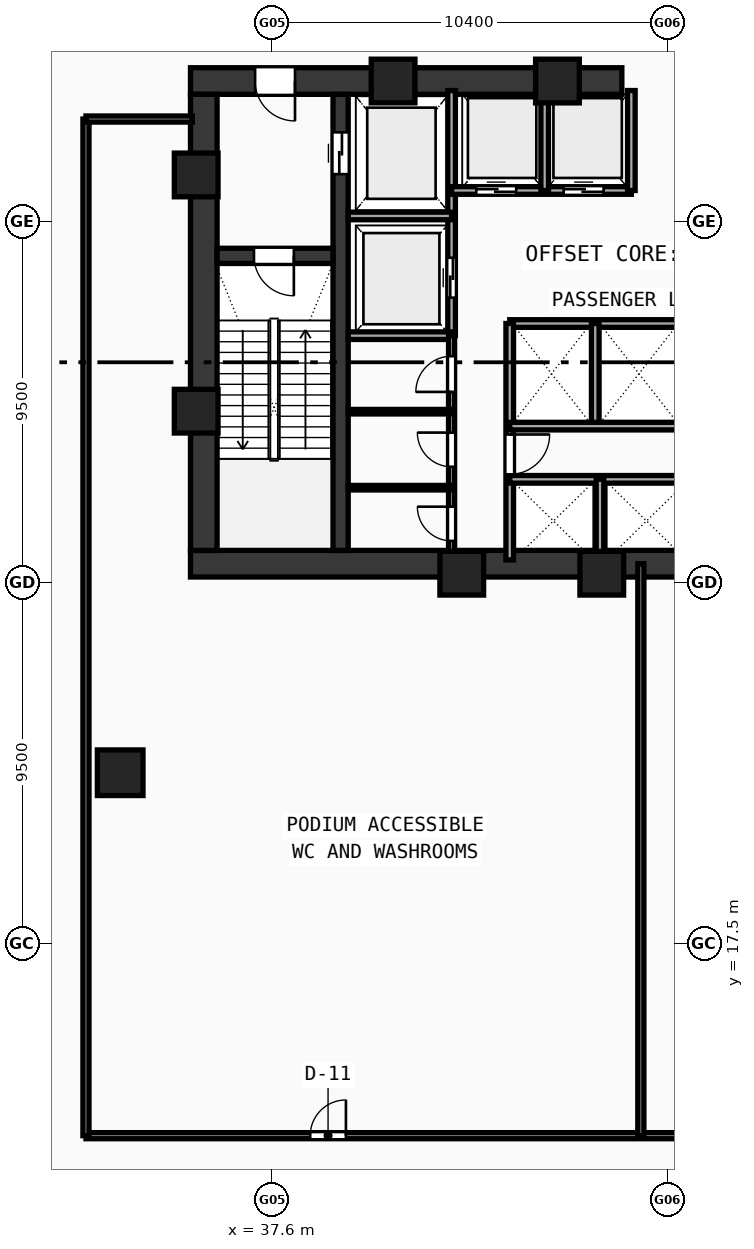
"""IFC4 building model, lengths in metres.
Left out: names, types, materials, properties, quantities, classifications, styles, units other than length and angle.
Written with IfcOpenShell. Run it as: python <this file> out.ifc"""

import sys

from ifc_helpers import new_model, si_unit, direction, frame, frame_2d, origin, origin_with_axes, origin_2d, place, context, subcontext, project, spatial, rectangle, hollow_rectangle, extrude, source, transform, mapped, element, fill, save


model = new_model("IFC4")
c1 = context("Model", 3, precision=1e-05, world=origin(), true_north=direction((0.0, 1.0)))
c2 = subcontext(c1, "Body", "Model", "MODEL_VIEW")
j1 = project(units=[si_unit("LENGTHUNIT", "METRE"), si_unit("PLANEANGLEUNIT", "RADIAN")], contexts=[c1])
p1 = place(None, origin())
s1 = spatial("IfcSite", under=j1, at=p1, CompositionType="ELEMENT")
p2 = place(p1, origin())
s2 = spatial("IfcBuilding", under=s1, at=p2, CompositionType="ELEMENT")
p3 = place(p2, frame((0.0, 0.0, 14.4)))
s3 = spatial("IfcBuildingStorey", under=s2, at=p3, CompositionType="ELEMENT", Elevation=14.4)
p4 = place(p3, frame((35.45, 27.5, 0.0), z_axis=(0.0, 0.0, 1.0), x_axis=(1.0, 0.0, 0.0)))
e1 = element("IfcWall", 1, at=p4, inside=s3, PredefinedType="SHEAR", context=c2, shape_type="SweptSolid", body=[
    extrude(rectangle(XDim=25.1, YDim=0.7, at=frame_2d((12.55, 0.0))), origin(), (0.0, 0.0, 1.0), 4.52),
])
p5 = place(p3, frame((35.45, 40.2, 0.0), z_axis=(0.0, 0.0, 1.0), x_axis=(1.0, 0.0, 0.0)))
e2 = element("IfcWall", 2, at=p5, inside=s3, PredefinedType="SHEAR", context=c2, shape_type="SweptSolid", body=[
    extrude(rectangle(XDim=11.35, YDim=0.7, at=frame_2d((5.675, 0.0))), origin(), (0.0, 0.0, 1.0), 4.52),
])
p6 = place(p5, frame((1.7, 0.0, 0.0)))
e3 = element("IfcOpeningElement", 3, at=p6, cuts=e2, PredefinedType="OPENING", context=c2, shape_type="SweptSolid", body=[
    extrude(rectangle(XDim=1.05, YDim=2.1, at=frame_2d((0.525, 1.05))), frame((0.0, 0.36, 0.0), z_axis=(0.0, -1.0, 0.0), x_axis=(1.0, 0.0, 0.0)), (0.0, 0.0, 1.0), 0.72),
])
p7 = place(p3, frame((35.8, 27.85, 0.0), z_axis=(0.0, 0.0, 1.0), x_axis=(0.0, 1.0, 0.0)))
e4 = element("IfcWall", 4, at=p7, inside=s3, PredefinedType="SHEAR", context=c2, shape_type="SweptSolid", body=[
    extrude(rectangle(XDim=12.0, YDim=0.7, at=frame_2d((6.0, 0.0))), origin(), (0.0, 0.0, 1.0), 4.52),
])
p8 = place(p3, frame((39.4, 27.85, 0.0), z_axis=(0.0, 0.0, 1.0), x_axis=(0.0, 1.0, 0.0)))
e5 = element("IfcWall", 5, at=p8, inside=s3, PredefinedType="SHEAR", context=c2, shape_type="SweptSolid", body=[
    extrude(rectangle(XDim=12.0, YDim=0.4, at=frame_2d((6.0, 0.0))), origin(), (0.0, 0.0, 1.0), 4.52),
])
p9 = place(p8, frame((9.9, 0.0, 0.0)))
e6 = element("IfcOpeningElement", 6, at=p9, cuts=e5, PredefinedType="OPENING", context=c2, shape_type="SweptSolid", body=[
    extrude(rectangle(XDim=1.1, YDim=2.1, at=frame_2d((0.55, 1.05))), frame((0.0, 0.21, 0.0), z_axis=(0.0, -1.0, 0.0), x_axis=(1.0, 0.0, 0.0)), (0.0, 0.0, 1.0), 0.42),
])
p10 = place(p3, frame((36.15, 35.6, 0.0), z_axis=(0.0, 0.0, 1.0), x_axis=(1.0, 0.0, 0.0)))
e7 = element("IfcWall", 7, at=p10, inside=s3, PredefinedType="SHEAR", context=c2, shape_type="SweptSolid", body=[
    extrude(rectangle(XDim=3.05, YDim=0.4, at=frame_2d((1.525, 0.0))), origin(), (0.0, 0.0, 1.0), 4.52),
])
p11 = place(p10, frame((0.97, 0.0, 0.0)))
e8 = element("IfcOpeningElement", 8, at=p11, cuts=e7, PredefinedType="OPENING", context=c2, shape_type="SweptSolid", body=[
    extrude(rectangle(XDim=1.05, YDim=2.1, at=frame_2d((0.525, 1.05))), frame((0.0, 0.21, 0.0), z_axis=(0.0, -1.0, 0.0), x_axis=(1.0, 0.0, 0.0)), (0.0, 0.0, 1.0), 0.42),
])
m1 = source(origin(), c2, "Body", "SweptSolid", [
    extrude(hollow_rectangle(XDim=1.15, YDim=1.15, WallThickness=0.048, at=origin_2d()), origin(), (0.0, 0.0, 1.0), 4.8),
])
for number, where, z_axis, x_axis in (
    (9, (42.588, 27.25, -0.28), (0.0, 0.0, 1.0), (1.0, 0.0, 0.0)),
    (10, (46.272, 27.25, -0.28), (0.0, 0.0, 1.0), (1.0, 0.0, 0.0)),
    (11, (45.106, 40.2, -0.28), (0.0, 0.0, 1.0), (1.0, 0.0, 0.0)),
    (12, (40.781, 40.2, -0.28), (0.0, 0.0, 1.0), (1.0, 0.0, 0.0)),
    (13, (35.6, 37.729, -0.28), (0.0, 0.0, 1.0), (1.0, 0.0, 0.0)),
    (14, (35.6, 31.513, -0.28), (0.0, 0.0, 1.0), (1.0, 0.0, 0.0)),
):
    element("IfcColumn", number, at=place(p3, frame(where, z_axis=z_axis, x_axis=x_axis)), inside=s3, PredefinedType="COLUMN", context=c2, shape_type="MappedRepresentation", body=[
        mapped(m1, transform((0.0, 0.0, 0.0), scale=1.0)),
    ])
m2 = source(origin(), c2, "Body", "SweptSolid", [
    extrude(hollow_rectangle(XDim=1.2, YDim=1.2, WallThickness=0.05, at=origin_2d()), origin(), (0.0, 0.0, 1.0), 4.8),
])
p12 = place(p3, frame((33.6, 22.0, -0.28), z_axis=(0.0, 0.0, 1.0), x_axis=(1.0, 0.0, 0.0)))
e15 = element("IfcColumn", 15, at=p12, inside=s3, PredefinedType="COLUMN", context=c2, shape_type="MappedRepresentation", body=[
    mapped(m2, transform((0.0, 0.0, 0.0), scale=1.0)),
])
p13 = place(p3, frame((42.32, 33.5, 0.0), z_axis=(0.0, 0.0, 1.0), x_axis=(0.0, 1.0, 0.0)))
e16 = element("IfcWall", 16, at=p13, inside=s3, PredefinedType="SOLIDWALL", context=c2, shape_type="SweptSolid", body=[
    extrude(rectangle(XDim=6.45, YDim=0.2, at=frame_2d((3.225, 0.0))), origin(), (0.0, 0.0, 1.0), 4.52),
])
p14 = place(p13, frame((1.0, 0.0, 0.0)))
e17 = element("IfcOpeningElement", 17, at=p14, cuts=e16, PredefinedType="OPENING", context=c2, shape_type="SweptSolid", body=[
    extrude(rectangle(XDim=1.05, YDim=2.1, at=frame_2d((0.525, 1.05))), frame((0.0, 0.11, 0.0), z_axis=(0.0, -1.0, 0.0), x_axis=(1.0, 0.0, 0.0)), (0.0, 0.0, 1.0), 0.22),
])
for number, where, z_axis, x_axis in (
    (18, (39.6, 36.65, 0.0), (0.0, 0.0, 1.0), (1.0, 0.0, 0.0)),
    (19, (39.6, 33.5, 0.0), (0.0, 0.0, 1.0), (1.0, 0.0, 0.0)),
):
    element("IfcWall", number, at=place(p3, frame(where, z_axis=z_axis, x_axis=x_axis)), inside=s3, PredefinedType="SOLIDWALL", context=c2, shape_type="SweptSolid", body=[
        extrude(rectangle(XDim=2.72, YDim=0.2, at=frame_2d((1.36, 0.0))), origin(), (0.0, 0.0, 1.0), 4.52),
    ])
p15 = place(p3, frame((42.32, 37.32, 0.0), z_axis=(0.0, 0.0, 1.0), x_axis=(1.0, 0.0, 0.0)))
e20 = element("IfcWall", 20, at=p15, inside=s3, PredefinedType="SOLIDWALL", context=c2, shape_type="SweptSolid", body=[
    extrude(rectangle(XDim=4.73, YDim=0.2, at=frame_2d((2.365, 0.0))), origin(), (0.0, 0.0, 1.0), 4.52),
])
p16 = place(p15, frame((0.65, 0.0, 0.0)))
e21 = element("IfcOpeningElement", 21, at=p16, cuts=e20, PredefinedType="OPENING", context=c2, shape_type="SweptSolid", body=[
    extrude(rectangle(XDim=1.05, YDim=2.1, at=frame_2d((0.525, 1.05))), frame((0.0, 0.11, 0.0), z_axis=(0.0, -1.0, 0.0), x_axis=(1.0, 0.0, 0.0)), (0.0, 0.0, 1.0), 0.22),
])
p17 = place(p15, frame((2.95, 0.0, 0.0)))
e22 = element("IfcOpeningElement", 22, at=p17, cuts=e20, PredefinedType="OPENING", context=c2, shape_type="SweptSolid", body=[
    extrude(rectangle(XDim=1.05, YDim=2.1, at=frame_2d((0.525, 1.05))), frame((0.0, 0.11, 0.0), z_axis=(0.0, -1.0, 0.0), x_axis=(1.0, 0.0, 0.0)), (0.0, 0.0, 1.0), 0.22),
])
for number, where, z_axis, x_axis in (
    (23, (47.05, 37.32, 0.0), (0.0, 0.0, 1.0), (0.0, 1.0, 0.0)),
    (24, (44.77, 37.32, 0.0), (0.0, 0.0, 1.0), (0.0, 1.0, 0.0)),
):
    element("IfcWall", number, at=place(p3, frame(where, z_axis=z_axis, x_axis=x_axis)), inside=s3, PredefinedType="SOLIDWALL", context=c2, shape_type="SweptSolid", body=[
        extrude(rectangle(XDim=2.63, YDim=0.2, at=frame_2d((1.315, 0.0))), origin(), (0.0, 0.0, 1.0), 4.52),
    ])
p18 = place(p3, frame((43.85, 33.82, 0.0), z_axis=(0.0, 0.0, 1.0), x_axis=(1.0, 0.0, 0.0)))
e25 = element("IfcWall", 25, at=p18, inside=s3, PredefinedType="SOLIDWALL", context=c2, shape_type="SweptSolid", body=[
    extrude(rectangle(XDim=9.83, YDim=0.2, at=frame_2d((4.915, 0.0))), origin(), (0.0, 0.0, 1.0), 4.52),
])
p19 = place(p3, frame((43.85, 27.6, 0.0), z_axis=(0.0, 0.0, 1.0), x_axis=(0.0, 1.0, 0.0)))
e26 = element("IfcWall", 26, at=p19, inside=s3, PredefinedType="SOLIDWALL", context=c2, shape_type="SweptSolid", body=[
    extrude(rectangle(XDim=6.22, YDim=0.2, at=frame_2d((3.11, 0.0))), origin(), (0.0, 0.0, 1.0), 4.52),
])
p20 = place(p19, frame((2.25, 0.0, 0.0)))
e27 = element("IfcOpeningElement", 27, at=p20, cuts=e26, PredefinedType="OPENING", context=c2, shape_type="SweptSolid", body=[
    extrude(rectangle(XDim=1.05, YDim=2.1, at=frame_2d((0.525, 1.05))), frame((0.0, 0.11, 0.0), z_axis=(0.0, -1.0, 0.0), x_axis=(1.0, 0.0, 0.0)), (0.0, 0.0, 1.0), 0.22),
])
p21 = place(p3, frame((46.1, 31.12, 0.0), z_axis=(0.0, 0.0, 1.0), x_axis=(0.0, 1.0, 0.0)))
e28 = element("IfcWall", 28, at=p21, inside=s3, PredefinedType="SOLIDWALL", context=c2, shape_type="SweptSolid", body=[
    extrude(rectangle(XDim=2.7, YDim=0.2, at=frame_2d((1.35, 0.0))), origin(), (0.0, 0.0, 1.0), 4.52),
])
p22 = place(p3, frame((43.85, 29.72, 0.0), z_axis=(0.0, 0.0, 1.0), x_axis=(1.0, 0.0, 0.0)))
e29 = element("IfcWall", 29, at=p22, inside=s3, PredefinedType="SOLIDWALL", context=c2, shape_type="SweptSolid", body=[
    extrude(rectangle(XDim=7.2, YDim=0.2, at=frame_2d((3.6, 0.0))), origin(), (0.0, 0.0, 1.0), 4.52),
])
p23 = place(p3, frame((43.85, 31.12, 0.0), z_axis=(0.0, 0.0, 1.0), x_axis=(1.0, 0.0, 0.0)))
e30 = element("IfcWall", 30, at=p23, inside=s3, PredefinedType="SOLIDWALL", context=c2, shape_type="SweptSolid", body=[
    extrude(rectangle(XDim=9.83, YDim=0.2, at=frame_2d((4.915, 0.0))), origin(), (0.0, 0.0, 1.0), 4.52),
])
p24 = place(p3, frame((46.225, 27.6, 0.0), z_axis=(0.0, 0.0, 1.0), x_axis=(0.0, 1.0, 0.0)))
e31 = element("IfcWall", 31, at=p24, inside=s3, PredefinedType="SOLIDWALL", context=c2, shape_type="SweptSolid", body=[
    extrude(rectangle(XDim=2.12, YDim=0.2, at=frame_2d((1.06, 0.0))), origin(), (0.0, 0.0, 1.0), 4.52),
])
p25 = place(p3, frame((42.32, 27.6, 0.0), z_axis=(0.0, 0.0, 1.0), x_axis=(0.0, 1.0, 0.0)))
e32 = element("IfcWall", 32, at=p25, inside=s3, PredefinedType="PARTITIONING", context=c2, shape_type="SweptSolid", body=[
    extrude(rectangle(XDim=5.9, YDim=0.16, at=frame_2d((2.95, 0.0))), origin(), (0.0, 0.0, 1.0), 4.52),
])
p26 = place(p25, frame((0.5, 0.0, 0.0)))
e33 = element("IfcOpeningElement", 33, at=p26, cuts=e32, PredefinedType="OPENING", context=c2, shape_type="SweptSolid", body=[
    extrude(rectangle(XDim=0.9, YDim=2.1, at=frame_2d((0.45, 1.05))), frame((0.0, 0.09, 0.0), z_axis=(0.0, -1.0, 0.0), x_axis=(1.0, 0.0, 0.0)), (0.0, 0.0, 1.0), 0.18),
])
p27 = place(p25, frame((2.45, 0.0, 0.0)))
e34 = element("IfcOpeningElement", 34, at=p27, cuts=e32, PredefinedType="OPENING", context=c2, shape_type="SweptSolid", body=[
    extrude(rectangle(XDim=0.9, YDim=2.1, at=frame_2d((0.45, 1.05))), frame((0.0, 0.09, 0.0), z_axis=(0.0, -1.0, 0.0), x_axis=(1.0, 0.0, 0.0)), (0.0, 0.0, 1.0), 0.18),
])
p28 = place(p25, frame((4.42, 0.0, 0.0)))
e35 = element("IfcOpeningElement", 35, at=p28, cuts=e32, PredefinedType="OPENING", context=c2, shape_type="SweptSolid", body=[
    extrude(rectangle(XDim=0.94, YDim=2.1, at=frame_2d((0.47, 1.05))), frame((0.0, 0.09, 0.0), z_axis=(0.0, -1.0, 0.0), x_axis=(1.0, 0.0, 0.0)), (0.0, 0.0, 1.0), 0.18),
])
for number, where, z_axis, x_axis in (
    (36, (39.6, 29.5, 0.0), (0.0, 0.0, 1.0), (1.0, 0.0, 0.0)),
    (37, (39.6, 31.5, 0.0), (0.0, 0.0, 1.0), (1.0, 0.0, 0.0)),
):
    element("IfcWall", number, at=place(p3, frame(where, z_axis=z_axis, x_axis=x_axis)), inside=s3, PredefinedType="PARTITIONING", context=c2, shape_type="SweptSolid", body=[
        extrude(rectangle(XDim=2.72, YDim=0.12, at=frame_2d((1.36, 0.0))), origin(), (0.0, 0.0, 1.0), 4.52),
    ])
p29 = place(p3, frame((32.7, 12.45, 0.0), z_axis=(0.0, 0.0, 1.0), x_axis=(1.0, 0.0, 0.0)))
e38 = element("IfcWall", 38, at=p29, inside=s3, PredefinedType="PARTITIONING", context=c2, shape_type="SweptSolid", body=[
    extrude(rectangle(XDim=30.6, YDim=0.16, at=frame_2d((15.3, 0.0))), origin(), (0.0, 0.0, 1.0), 3.62),
])
p30 = place(p29, frame((17.6, 0.0, 0.0)))
e39 = element("IfcOpeningElement", 39, at=p30, cuts=e38, PredefinedType="OPENING", context=c2, shape_type="SweptSolid", body=[
    extrude(rectangle(XDim=0.92, YDim=2.1, at=frame_2d((0.46, 1.05))), frame((0.0, 0.09, 0.0), z_axis=(0.0, -1.0, 0.0), x_axis=(1.0, 0.0, 0.0)), (0.0, 0.0, 1.0), 0.18),
])
p31 = place(p29, frame((5.9, 0.0, 0.0)))
e40 = element("IfcOpeningElement", 40, at=p31, cuts=e38, PredefinedType="OPENING", context=c2, shape_type="SweptSolid", body=[
    extrude(rectangle(XDim=0.94, YDim=2.1, at=frame_2d((0.47, 1.05))), frame((0.0, 0.09, 0.0), z_axis=(0.0, -1.0, 0.0), x_axis=(1.0, 0.0, 0.0)), (0.0, 0.0, 1.0), 0.18),
])
p32 = place(p3, frame((32.7, 12.45, 0.0), z_axis=(0.0, 0.0, 1.0), x_axis=(0.0, 1.0, 0.0)))
e41 = element("IfcWall", 41, at=p32, inside=s3, PredefinedType="PARTITIONING", context=c2, shape_type="SweptSolid", body=[
    extrude(rectangle(XDim=26.75, YDim=0.16, at=frame_2d((13.375, 0.0))), origin(), (0.0, 0.0, 1.0), 3.62),
])
p33 = place(p3, frame((32.7, 39.2, 0.0), z_axis=(0.0, 0.0, 1.0), x_axis=(1.0, 0.0, 0.0)))
e42 = element("IfcWall", 42, at=p33, inside=s3, PredefinedType="PARTITIONING", context=c2, shape_type="SweptSolid", body=[
    extrude(rectangle(XDim=2.8, YDim=0.16, at=frame_2d((1.4, 0.0))), origin(), (0.0, 0.0, 1.0), 3.62),
])
p34 = place(p3, frame((47.3, 12.45, 0.0), z_axis=(0.0, 0.0, 1.0), x_axis=(0.0, 1.0, 0.0)))
e43 = element("IfcWall", 43, at=p34, inside=s3, PredefinedType="PARTITIONING", context=c2, shape_type="SweptSolid", body=[
    extrude(rectangle(XDim=15.05, YDim=0.16, at=frame_2d((7.525, 0.0))), origin(), (0.0, 0.0, 1.0), 3.62),
])
p35 = place(p3, frame((45.0, 34.4, 0.0), z_axis=(0.0, 0.0, 1.0), x_axis=(1.0, 0.0, 0.0)))
e44 = element("IfcWall", 44, at=p35, inside=s3, PredefinedType="MOVABLE", context=c2, shape_type="SweptSolid", body=[
    extrude(rectangle(XDim=6.0, YDim=0.11, at=frame_2d((3.0, 0.0))), origin(), (0.0, 0.0, 1.0), 2.5),
])
m3 = source(origin(), c2, "Body", "SweptSolid", [
    extrude(rectangle(XDim=1.05, YDim=2.1, at=frame_2d((0.525, 1.05))), frame((0.0, 0.025, 0.0), z_axis=(0.0, -1.0, 0.0), x_axis=(1.0, 0.0, 0.0)), (0.0, 0.0, 1.0), 0.05),
])
p36 = place(p11, frame((1.05, 0.0, 0.0), z_axis=(0.0, 0.0, 1.0), x_axis=(-1.0, 0.0, 0.0)))
e45 = element("IfcDoor", 45, at=p36, inside=s3, OperationType="SINGLE_SWING_LEFT", PredefinedType="DOOR", context=c2, shape_type="MappedRepresentation", body=[
    mapped(m3, transform((0.0, 0.0, 0.0), scale=1.0)),
])
fill(e8, e45)
p37 = place(p6, frame((1.05, 0.0, 0.0), z_axis=(0.0, 0.0, 1.0), x_axis=(-1.0, 0.0, 0.0)))
e46 = element("IfcDoor", 46, at=p37, inside=s3, OperationType="SINGLE_SWING_LEFT", PredefinedType="DOOR", context=c2, shape_type="MappedRepresentation", body=[
    mapped(m3, transform((0.0, 0.0, 0.0), scale=1.0)),
])
fill(e3, e46)
m4 = source(origin(), c2, "Body", "SweptSolid", [
    extrude(rectangle(XDim=1.1, YDim=2.1, at=frame_2d((0.55, 1.05))), frame((0.0, 0.025, 0.0), z_axis=(0.0, -1.0, 0.0), x_axis=(1.0, 0.0, 0.0)), (0.0, 0.0, 1.0), 0.05),
])
p38 = place(p9, frame((1.1, 0.0, 0.0), z_axis=(0.0, 0.0, 1.0), x_axis=(-1.0, 0.0, 0.0)))
e47 = element("IfcDoor", 47, at=p38, inside=s3, OperationType="DOUBLE_DOOR_SLIDING", PredefinedType="DOOR", context=c2, shape_type="MappedRepresentation", body=[
    mapped(m4, transform((0.0, 0.0, 0.0), scale=1.0)),
])
fill(e6, e47)
p39 = place(p14, origin_with_axes())
e48 = element("IfcDoor", 48, at=p39, inside=s3, OperationType="DOUBLE_DOOR_SLIDING", PredefinedType="DOOR", context=c2, shape_type="MappedRepresentation", body=[
    mapped(m3, transform((0.0, 0.0, 0.0), scale=1.0)),
])
fill(e17, e48)
p40 = place(p16, frame((1.05, 0.0, 0.0), z_axis=(0.0, 0.0, 1.0), x_axis=(-1.0, 0.0, 0.0)))
e49 = element("IfcDoor", 49, at=p40, inside=s3, OperationType="DOUBLE_DOOR_SLIDING", PredefinedType="DOOR", context=c2, shape_type="MappedRepresentation", body=[
    mapped(m3, transform((0.0, 0.0, 0.0), scale=1.0)),
])
fill(e21, e49)
p41 = place(p17, frame((1.05, 0.0, 0.0), z_axis=(0.0, 0.0, 1.0), x_axis=(-1.0, 0.0, 0.0)))
e50 = element("IfcDoor", 50, at=p41, inside=s3, OperationType="DOUBLE_DOOR_SLIDING", PredefinedType="DOOR", context=c2, shape_type="MappedRepresentation", body=[
    mapped(m3, transform((0.0, 0.0, 0.0), scale=1.0)),
])
fill(e22, e50)
p42 = place(p20, frame((1.05, 0.0, 0.0), z_axis=(0.0, 0.0, 1.0), x_axis=(-1.0, 0.0, 0.0)))
e51 = element("IfcDoor", 51, at=p42, inside=s3, OperationType="SINGLE_SWING_LEFT", PredefinedType="DOOR", context=c2, shape_type="MappedRepresentation", body=[
    mapped(m3, transform((0.0, 0.0, 0.0), scale=1.0)),
])
fill(e27, e51)
m5 = source(origin(), c2, "Body", "SweptSolid", [
    extrude(rectangle(XDim=0.9, YDim=2.1, at=frame_2d((0.45, 1.05))), frame((0.0, 0.025, 0.0), z_axis=(0.0, -1.0, 0.0), x_axis=(1.0, 0.0, 0.0)), (0.0, 0.0, 1.0), 0.05),
])
p43 = place(p26, origin_with_axes())
e52 = element("IfcDoor", 52, at=p43, inside=s3, OperationType="SINGLE_SWING_RIGHT", PredefinedType="DOOR", context=c2, shape_type="MappedRepresentation", body=[
    mapped(m5, transform((0.0, 0.0, 0.0), scale=1.0)),
])
fill(e33, e52)
p44 = place(p27, origin_with_axes())
e53 = element("IfcDoor", 53, at=p44, inside=s3, OperationType="SINGLE_SWING_RIGHT", PredefinedType="DOOR", context=c2, shape_type="MappedRepresentation", body=[
    mapped(m5, transform((0.0, 0.0, 0.0), scale=1.0)),
])
fill(e34, e53)
m6 = source(origin(), c2, "Body", "SweptSolid", [
    extrude(rectangle(XDim=0.94, YDim=2.1, at=frame_2d((0.47, 1.05))), frame((0.0, 0.025, 0.0), z_axis=(0.0, -1.0, 0.0), x_axis=(1.0, 0.0, 0.0)), (0.0, 0.0, 1.0), 0.05),
])
p45 = place(p28, origin_with_axes())
e54 = element("IfcDoor", 54, at=p45, inside=s3, OperationType="SINGLE_SWING_LEFT", PredefinedType="DOOR", context=c2, shape_type="MappedRepresentation", body=[
    mapped(m6, transform((0.0, 0.0, 0.0), scale=1.0)),
])
fill(e35, e54)
p46 = place(p31, origin_with_axes())
e55 = element("IfcDoor", 55, at=p46, inside=s3, OperationType="SINGLE_SWING_RIGHT", PredefinedType="DOOR", context=c2, shape_type="MappedRepresentation", body=[
    mapped(m6, transform((0.0, 0.0, 0.0), scale=1.0)),
])
fill(e40, e55)
save(model, sys.argv[1])
